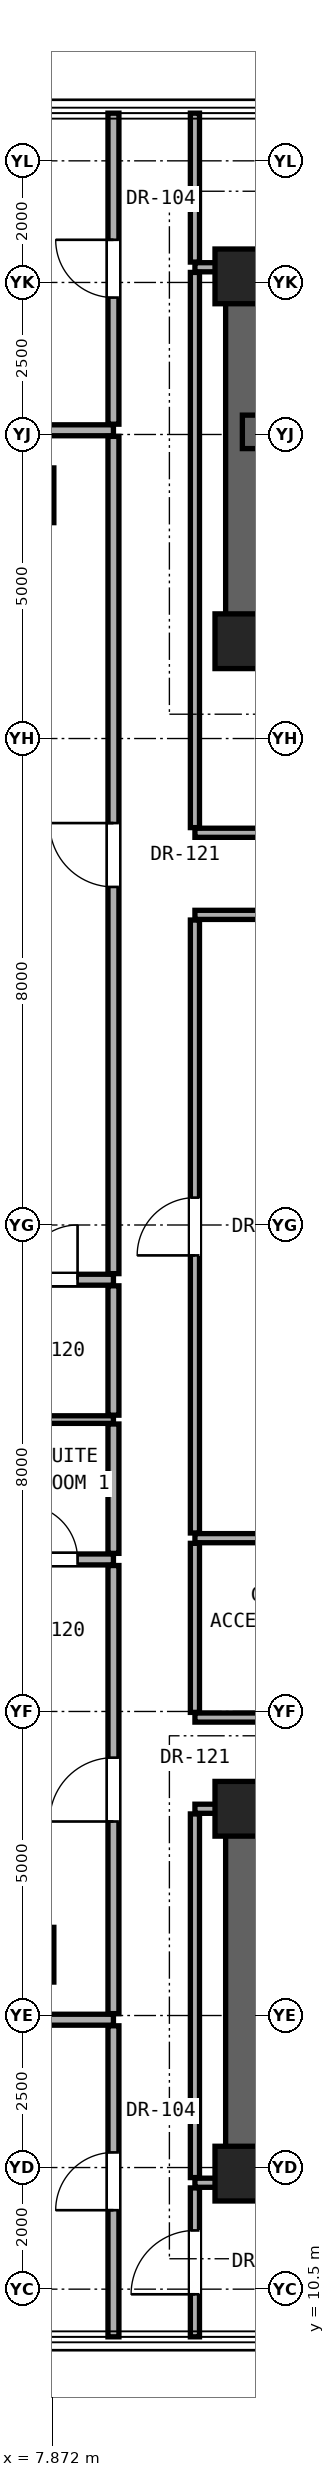
"""IFC4 building model, lengths in metres.
Left out: names, types, materials, properties, quantities, classifications, styles, units other than length and angle.
Written with IfcOpenShell. Run it as: python <this file> out.ifc"""

import sys

from ifc_helpers import new_model, si_unit, direction, frame, frame_2d, origin, origin_2d, place, context, subcontext, project, spatial, rectangle, extrude, element, fill, save


model = new_model("IFC4")
c1 = context("Model", 3, precision=1e-05, world=origin(), true_north=direction((0.0, 1.0)))
c2 = subcontext(c1, "Body", "Model", "MODEL_VIEW")
j1 = project(units=[si_unit("LENGTHUNIT", "METRE"), si_unit("PLANEANGLEUNIT", "RADIAN")], contexts=[c1])
p1 = place(None, origin())
s1 = spatial("IfcSite", under=j1, at=p1, CompositionType="ELEMENT")
p2 = place(p1, origin())
s2 = spatial("IfcBuilding", under=s1, at=p2, CompositionType="ELEMENT")
p3 = place(p2, frame((0.0, 0.0, 193.4)))
s3 = spatial("IfcBuildingStorey", under=s2, at=p3, CompositionType="ELEMENT", Elevation=193.4)
for number, where, z_axis, x_axis in (
    (1, (11.0, 12.4, 0.0), (0.0, 0.0, 1.0), (1.0, 0.0, 0.0)),
    (2, (11.0, 18.4, 0.0), (0.0, 0.0, 1.0), (1.0, 0.0, 0.0)),
    (3, (11.0, 37.6, 0.0), (0.0, 0.0, 1.0), (1.0, 0.0, 0.0)),
    (4, (11.0, 43.6, 0.0), (0.0, 0.0, 1.0), (1.0, 0.0, 0.0)),
):
    element("IfcColumn", number, at=place(p3, frame(where, z_axis=z_axis, x_axis=x_axis)), inside=s3, PredefinedType="COLUMN", context=c2, shape_type="SweptSolid", body=[
        extrude(rectangle(XDim=0.9, YDim=0.9, at=origin_2d()), origin(), (0.0, 0.0, 1.0), 3.25),
    ])
for number, where, z_axis, x_axis in (
    (5, (7.6, 16.0, 0.0), (0.0, 0.0, 1.0), (1.0, 0.0, 0.0)),
    (6, (7.6, 40.0, 0.0), (0.0, 0.0, 1.0), (1.0, 0.0, 0.0)),
):
    element("IfcColumn", number, at=place(p3, frame(where, z_axis=z_axis, x_axis=x_axis)), inside=s3, PredefinedType="PILASTER", context=c2, shape_type="SweptSolid", body=[
        extrude(rectangle(XDim=0.6, YDim=0.9, at=origin_2d()), origin(), (0.0, 0.0, 1.0), 3.25),
    ])
p4 = place(p3, frame((11.0, 43.6, 0.0), z_axis=(0.0, 0.0, 1.0), x_axis=(1.0, 0.0, 0.0)))
e7 = element("IfcWall", 7, at=p4, inside=s3, PredefinedType="SHEAR", context=c2, shape_type="SweptSolid", body=[
    extrude(rectangle(XDim=19.0, YDim=0.55, at=frame_2d((9.5, 0.0))), origin(), (0.0, 0.0, 1.0), 3.05),
])
p5 = place(p3, frame((11.0, 37.6, 0.0), z_axis=(0.0, 0.0, 1.0), x_axis=(0.0, 1.0, 0.0)))
e8 = element("IfcWall", 8, at=p5, inside=s3, PredefinedType="SHEAR", context=c2, shape_type="SweptSolid", body=[
    extrude(rectangle(XDim=6.0, YDim=0.55, at=frame_2d((3.0, 0.0))), origin(), (0.0, 0.0, 1.0), 3.05),
])
p6 = place(p3, frame((11.0, 37.6, 0.0), z_axis=(0.0, 0.0, 1.0), x_axis=(1.0, 0.0, 0.0)))
e9 = element("IfcWall", 9, at=p6, inside=s3, PredefinedType="SHEAR", context=c2, shape_type="SweptSolid", body=[
    extrude(rectangle(XDim=19.0, YDim=0.55, at=frame_2d((9.5, 0.0))), origin(), (0.0, 0.0, 1.0), 3.05),
])
p7 = place(p6, frame((1.06, 0.0, 0.0)))
e10 = element("IfcOpeningElement", 10, at=p7, cuts=e9, PredefinedType="OPENING", context=c2, shape_type="SweptSolid", body=[
    extrude(rectangle(XDim=1.15, YDim=2.2, at=frame_2d((0.575, 1.1))), frame((0.0, 0.285, 0.0), z_axis=(0.0, -1.0, 0.0), x_axis=(1.0, 0.0, 0.0)), (0.0, 0.0, 1.0), 0.57),
])
p8 = place(p6, frame((9.55, 0.0, 0.0)))
e11 = element("IfcOpeningElement", 11, at=p8, cuts=e9, PredefinedType="OPENING", context=c2, shape_type="SweptSolid", body=[
    extrude(rectangle(XDim=1.4, YDim=2.35, at=frame_2d((0.7, 1.175))), frame((0.0, 0.285, 0.0), z_axis=(0.0, -1.0, 0.0), x_axis=(1.0, 0.0, 0.0)), (0.0, 0.0, 1.0), 0.57),
])
p9 = place(p6, frame((11.95, 0.0, 0.0)))
e12 = element("IfcOpeningElement", 12, at=p9, cuts=e9, PredefinedType="OPENING", context=c2, shape_type="SweptSolid", body=[
    extrude(rectangle(XDim=1.4, YDim=2.35, at=frame_2d((0.7, 1.175))), frame((0.0, 0.285, 0.0), z_axis=(0.0, -1.0, 0.0), x_axis=(1.0, 0.0, 0.0)), (0.0, 0.0, 1.0), 0.57),
])
p10 = place(p3, frame((11.0, 41.043, 0.0), z_axis=(0.0, 0.0, 1.0), x_axis=(1.0, 0.0, 0.0)))
e13 = element("IfcWall", 13, at=p10, inside=s3, PredefinedType="SHEAR", context=c2, shape_type="SweptSolid", body=[
    extrude(rectangle(XDim=9.0, YDim=0.55, at=frame_2d((4.5, 0.0))), origin(), (0.0, 0.0, 1.0), 3.05),
])
p11 = place(p3, frame((11.0, 12.4, 0.0), z_axis=(0.0, 0.0, 1.0), x_axis=(1.0, 0.0, 0.0)))
e14 = element("IfcWall", 14, at=p11, inside=s3, PredefinedType="SHEAR", context=c2, shape_type="SweptSolid", body=[
    extrude(rectangle(XDim=19.0, YDim=0.55, at=frame_2d((9.5, 0.0))), origin(), (0.0, 0.0, 1.0), 3.05),
])
p12 = place(p3, frame((11.0, 12.4, 0.0), z_axis=(0.0, 0.0, 1.0), x_axis=(0.0, 1.0, 0.0)))
e15 = element("IfcWall", 15, at=p12, inside=s3, PredefinedType="SHEAR", context=c2, shape_type="SweptSolid", body=[
    extrude(rectangle(XDim=6.0, YDim=0.55, at=frame_2d((3.0, 0.0))), origin(), (0.0, 0.0, 1.0), 3.05),
])
p13 = place(p3, frame((11.0, 18.4, 0.0), z_axis=(0.0, 0.0, 1.0), x_axis=(1.0, 0.0, 0.0)))
e16 = element("IfcWall", 16, at=p13, inside=s3, PredefinedType="SHEAR", context=c2, shape_type="SweptSolid", body=[
    extrude(rectangle(XDim=19.0, YDim=0.55, at=frame_2d((9.5, 0.0))), origin(), (0.0, 0.0, 1.0), 3.05),
])
p14 = place(p13, frame((4.175, 0.0, 0.0)))
e17 = element("IfcOpeningElement", 17, at=p14, cuts=e16, PredefinedType="OPENING", context=c2, shape_type="SweptSolid", body=[
    extrude(rectangle(XDim=1.2, YDim=2.25, at=frame_2d((0.6, 1.125))), frame((0.0, 0.285, 0.0), z_axis=(0.0, -1.0, 0.0), x_axis=(1.0, 0.0, 0.0)), (0.0, 0.0, 1.0), 0.57),
])
p15 = place(p13, frame((11.075, 0.0, 0.0)))
e18 = element("IfcOpeningElement", 18, at=p15, cuts=e16, PredefinedType="OPENING", context=c2, shape_type="SweptSolid", body=[
    extrude(rectangle(XDim=0.95, YDim=2.15, at=frame_2d((0.475, 1.075))), frame((0.0, 0.285, 0.0), z_axis=(0.0, -1.0, 0.0), x_axis=(1.0, 0.0, 0.0)), (0.0, 0.0, 1.0), 0.57),
])
p16 = place(p13, frame((14.3, 0.0, 0.0)))
e19 = element("IfcOpeningElement", 19, at=p16, cuts=e16, PredefinedType="OPENING", context=c2, shape_type="SweptSolid", body=[
    extrude(rectangle(XDim=1.3, YDim=2.3, at=frame_2d((0.65, 1.15))), frame((0.0, 0.285, 0.0), z_axis=(0.0, -1.0, 0.0), x_axis=(1.0, 0.0, 0.0)), (0.0, 0.0, 1.0), 0.57),
])
p17 = place(p13, frame((16.6, 0.0, 0.0)))
e20 = element("IfcOpeningElement", 20, at=p17, cuts=e16, PredefinedType="OPENING", context=c2, shape_type="SweptSolid", body=[
    extrude(rectangle(XDim=1.3, YDim=2.3, at=frame_2d((0.65, 1.15))), frame((0.0, 0.285, 0.0), z_axis=(0.0, -1.0, 0.0), x_axis=(1.0, 0.0, 0.0)), (0.0, 0.0, 1.0), 0.57),
])
p18 = place(p3, frame((10.22, 12.25, 0.0), z_axis=(0.0, 0.0, 1.0), x_axis=(1.0, 0.0, 0.0)))
e21 = element("IfcWall", 21, at=p18, inside=s3, PredefinedType="PARTITIONING", context=c2, shape_type="SweptSolid", body=[
    extrude(rectangle(XDim=0.51, YDim=0.15, at=frame_2d((0.255, 0.0))), origin(), (0.0, 0.0, 1.0), 3.05),
])
p19 = place(p3, frame((5.565, 14.931, 0.0), z_axis=(0.0, 0.0, 1.0), x_axis=(1.0, 0.0, 0.0)))
e22 = element("IfcWall", 22, at=p19, inside=s3, PredefinedType="PARTITIONING", context=c2, shape_type="SweptSolid", body=[
    extrude(rectangle(XDim=3.315, YDim=0.18, at=frame_2d((1.657, 0.0))), origin(), (0.0, 0.0, 1.0), 3.05),
])
p20 = place(p3, frame((10.22, 18.4, 0.0), z_axis=(0.0, 0.0, 1.0), x_axis=(1.0, 0.0, 0.0)))
e23 = element("IfcWall", 23, at=p20, inside=s3, PredefinedType="PARTITIONING", context=c2, shape_type="SweptSolid", body=[
    extrude(rectangle(XDim=0.51, YDim=0.15, at=frame_2d((0.255, 0.0))), origin(), (0.0, 0.0, 1.0), 2.442),
])
p21 = place(p3, frame((10.22, 19.9, 0.0), z_axis=(0.0, 0.0, 1.0), x_axis=(1.0, 0.0, 0.0)))
e24 = element("IfcWall", 24, at=p21, inside=s3, PredefinedType="PARTITIONING", context=c2, shape_type="SweptSolid", body=[
    extrude(rectangle(XDim=20.56, YDim=0.15, at=frame_2d((10.28, 0.0))), origin(), (0.0, 0.0, 1.0), 2.186),
])
p22 = place(p21, frame((1.36, 0.0, 0.0)))
e25 = element("IfcOpeningElement", 25, at=p22, cuts=e24, PredefinedType="OPENING", context=c2, shape_type="SweptSolid", body=[
    extrude(rectangle(XDim=0.9, YDim=2.1, at=frame_2d((0.45, 1.05))), frame((0.0, 0.085, 0.0), z_axis=(0.0, -1.0, 0.0), x_axis=(1.0, 0.0, 0.0)), (0.0, 0.0, 1.0), 0.17),
])
p23 = place(p21, frame((4.015, 0.0, 0.0)))
e26 = element("IfcOpeningElement", 26, at=p23, cuts=e24, PredefinedType="OPENING", context=c2, shape_type="SweptSolid", body=[
    extrude(rectangle(XDim=0.95, YDim=2.15, at=frame_2d((0.475, 1.075))), frame((0.0, 0.085, 0.0), z_axis=(0.0, -1.0, 0.0), x_axis=(1.0, 0.0, 0.0)), (0.0, 0.0, 1.0), 0.17),
])
p24 = place(p21, frame((12.835, 0.0, 0.0)))
e27 = element("IfcOpeningElement", 27, at=p24, cuts=e24, PredefinedType="OPENING", context=c2, shape_type="SweptSolid", body=[
    extrude(rectangle(XDim=0.85, YDim=2.01, at=frame_2d((0.425, 1.005))), frame((0.0, 0.085, 0.0), z_axis=(0.0, -1.0, 0.0), x_axis=(1.0, 0.0, 0.0)), (0.0, 0.0, 1.0), 0.17),
])
p25 = place(p3, frame((0.33, 22.5, 0.0), z_axis=(0.0, 0.0, 1.0), x_axis=(1.0, 0.0, 0.0)))
e28 = element("IfcWall", 28, at=p25, inside=s3, PredefinedType="PARTITIONING", context=c2, shape_type="SweptSolid", body=[
    extrude(rectangle(XDim=8.55, YDim=0.18, at=frame_2d((4.275, 0.0))), origin(), (0.0, 0.0, 1.0), 2.269),
])
p26 = place(p25, frame((2.8, 0.0, 0.0)))
e29 = element("IfcOpeningElement", 29, at=p26, cuts=e28, PredefinedType="OPENING", context=c2, shape_type="SweptSolid", body=[
    extrude(rectangle(XDim=0.95, YDim=2.15, at=frame_2d((0.475, 1.075))), frame((0.0, 0.1, 0.0), z_axis=(0.0, -1.0, 0.0), x_axis=(1.0, 0.0, 0.0)), (0.0, 0.0, 1.0), 0.2),
])
p27 = place(p25, frame((7.06, 0.0, 0.0)))
e30 = element("IfcOpeningElement", 30, at=p27, cuts=e28, PredefinedType="OPENING", context=c2, shape_type="SweptSolid", body=[
    extrude(rectangle(XDim=0.9, YDim=2.1, at=frame_2d((0.45, 1.05))), frame((0.0, 0.1, 0.0), z_axis=(0.0, -1.0, 0.0), x_axis=(1.0, 0.0, 0.0)), (0.0, 0.0, 1.0), 0.2),
])
p28 = place(p3, frame((10.22, 22.85, 0.0), z_axis=(0.0, 0.0, 1.0), x_axis=(1.0, 0.0, 0.0)))
e31 = element("IfcWall", 31, at=p28, inside=s3, PredefinedType="PARTITIONING", context=c2, shape_type="SweptSolid", body=[
    extrude(rectangle(XDim=6.0, YDim=0.15, at=frame_2d((3.0, 0.0))), origin(), (0.0, 0.0, 1.0), 2.186),
])
p29 = place(p3, frame((0.33, 24.8, 0.0), z_axis=(0.0, 0.0, 1.0), x_axis=(1.0, 0.0, 0.0)))
e32 = element("IfcWall", 32, at=p29, inside=s3, PredefinedType="PARTITIONING", context=c2, shape_type="SweptSolid", body=[
    extrude(rectangle(XDim=8.55, YDim=0.125, at=frame_2d((4.275, 0.0))), origin(), (0.0, 0.0, 1.0), 2.269),
])
p30 = place(p3, frame((0.33, 27.1, 0.0), z_axis=(0.0, 0.0, 1.0), x_axis=(1.0, 0.0, 0.0)))
e33 = element("IfcWall", 33, at=p30, inside=s3, PredefinedType="PARTITIONING", context=c2, shape_type="SweptSolid", body=[
    extrude(rectangle(XDim=8.55, YDim=0.18, at=frame_2d((4.275, 0.0))), origin(), (0.0, 0.0, 1.0), 2.269),
])
p31 = place(p30, frame((2.8, 0.0, 0.0)))
e34 = element("IfcOpeningElement", 34, at=p31, cuts=e33, PredefinedType="OPENING", context=c2, shape_type="SweptSolid", body=[
    extrude(rectangle(XDim=0.95, YDim=2.15, at=frame_2d((0.475, 1.075))), frame((0.0, 0.1, 0.0), z_axis=(0.0, -1.0, 0.0), x_axis=(1.0, 0.0, 0.0)), (0.0, 0.0, 1.0), 0.2),
])
p32 = place(p30, frame((7.06, 0.0, 0.0)))
e35 = element("IfcOpeningElement", 35, at=p32, cuts=e33, PredefinedType="OPENING", context=c2, shape_type="SweptSolid", body=[
    extrude(rectangle(XDim=0.9, YDim=2.1, at=frame_2d((0.45, 1.05))), frame((0.0, 0.1, 0.0), z_axis=(0.0, -1.0, 0.0), x_axis=(1.0, 0.0, 0.0)), (0.0, 0.0, 1.0), 0.2),
])
p33 = place(p3, frame((10.22, 33.1, 0.0), z_axis=(0.0, 0.0, 1.0), x_axis=(1.0, 0.0, 0.0)))
e36 = element("IfcWall", 36, at=p33, inside=s3, PredefinedType="PARTITIONING", context=c2, shape_type="SweptSolid", body=[
    extrude(rectangle(XDim=20.56, YDim=0.15, at=frame_2d((10.28, 0.0))), origin(), (0.0, 0.0, 1.0), 2.186),
])
p34 = place(p33, frame((9.07, 0.0, 0.0)))
e37 = element("IfcOpeningElement", 37, at=p34, cuts=e36, PredefinedType="OPENING", context=c2, shape_type="SweptSolid", body=[
    extrude(rectangle(XDim=0.85, YDim=2.01, at=frame_2d((0.425, 1.005))), frame((0.0, 0.085, 0.0), z_axis=(0.0, -1.0, 0.0), x_axis=(1.0, 0.0, 0.0)), (0.0, 0.0, 1.0), 0.17),
])
p35 = place(p33, frame((16.33, 0.0, 0.0)))
e38 = element("IfcOpeningElement", 38, at=p35, cuts=e36, PredefinedType="OPENING", context=c2, shape_type="SweptSolid", body=[
    extrude(rectangle(XDim=0.85, YDim=2.01, at=frame_2d((0.425, 1.005))), frame((0.0, 0.085, 0.0), z_axis=(0.0, -1.0, 0.0), x_axis=(1.0, 0.0, 0.0)), (0.0, 0.0, 1.0), 0.17),
])
p36 = place(p3, frame((10.22, 34.45, 0.0), z_axis=(0.0, 0.0, 1.0), x_axis=(1.0, 0.0, 0.0)))
e39 = element("IfcWall", 39, at=p36, inside=s3, PredefinedType="PARTITIONING", context=c2, shape_type="SweptSolid", body=[
    extrude(rectangle(XDim=1.58, YDim=0.15, at=frame_2d((0.79, 0.0))), origin(), (0.0, 0.0, 1.0), 2.186),
])
p37 = place(p3, frame((5.565, 41.069, 0.0), z_axis=(0.0, 0.0, 1.0), x_axis=(1.0, 0.0, 0.0)))
e40 = element("IfcWall", 40, at=p37, inside=s3, PredefinedType="PARTITIONING", context=c2, shape_type="SweptSolid", body=[
    extrude(rectangle(XDim=3.315, YDim=0.18, at=frame_2d((1.657, 0.0))), origin(), (0.0, 0.0, 1.0), 3.05),
])
p38 = place(p3, frame((10.22, 43.75, 0.0), z_axis=(0.0, 0.0, 1.0), x_axis=(1.0, 0.0, 0.0)))
e41 = element("IfcWall", 41, at=p38, inside=s3, PredefinedType="PARTITIONING", context=c2, shape_type="SweptSolid", body=[
    extrude(rectangle(XDim=0.51, YDim=0.15, at=frame_2d((0.255, 0.0))), origin(), (0.0, 0.0, 1.0), 3.05),
])
p39 = place(p3, frame((8.88, 9.716, 0.0), z_axis=(0.0, 0.0, 1.0), x_axis=(0.0, 1.0, 0.0)))
e42 = element("IfcWall", 42, at=p39, inside=s3, PredefinedType="PARTITIONING", context=c2, shape_type="SweptSolid", body=[
    extrude(rectangle(XDim=5.115, YDim=0.18, at=frame_2d((2.558, 0.0))), origin(), (0.0, 0.0, 1.0), 3.05),
])
p40 = place(p39, frame((2.083, 0.0, 0.0)))
e43 = element("IfcOpeningElement", 43, at=p40, cuts=e42, PredefinedType="OPENING", context=c2, shape_type="SweptSolid", body=[
    extrude(rectangle(XDim=0.95, YDim=2.15, at=frame_2d((0.475, 1.075))), frame((0.0, 0.1, 0.0), z_axis=(0.0, -1.0, 0.0), x_axis=(1.0, 0.0, 0.0)), (0.0, 0.0, 1.0), 0.2),
])
p41 = place(p3, frame((8.88, 15.031, 0.0), z_axis=(0.0, 0.0, 1.0), x_axis=(0.0, 1.0, 0.0)))
e44 = element("IfcWall", 44, at=p41, inside=s3, PredefinedType="PARTITIONING", context=c2, shape_type="SweptSolid", body=[
    extrude(rectangle(XDim=7.369, YDim=0.18, at=frame_2d((3.685, 0.0))), origin(), (0.0, 0.0, 1.0), 2.442),
])
p42 = place(p41, frame((3.159, 0.0, 0.0)))
e45 = element("IfcOpeningElement", 45, at=p42, cuts=e44, PredefinedType="OPENING", context=c2, shape_type="SweptSolid", body=[
    extrude(rectangle(XDim=1.05, YDim=2.2, at=frame_2d((0.525, 1.1))), frame((0.0, 0.1, 0.0), z_axis=(0.0, -1.0, 0.0), x_axis=(1.0, 0.0, 0.0)), (0.0, 0.0, 1.0), 0.2),
])
for number, where, z_axis, x_axis in (
    (46, (8.88, 22.6, 0.0), (0.0, 0.0, 1.0), (0.0, 1.0, 0.0)),
    (47, (8.88, 24.873, 0.0), (0.0, 0.0, 1.0), (0.0, 1.0, 0.0)),
):
    element("IfcWall", number, at=place(p3, frame(where, z_axis=z_axis, x_axis=x_axis)), inside=s3, PredefinedType="PARTITIONING", context=c2, shape_type="SweptSolid", body=[
        extrude(rectangle(XDim=2.127, YDim=0.18, at=frame_2d((1.064, 0.0))), origin(), (0.0, 0.0, 1.0), 2.346),
    ])
p43 = place(p3, frame((8.88, 27.2, 0.0), z_axis=(0.0, 0.0, 1.0), x_axis=(0.0, 1.0, 0.0)))
e48 = element("IfcWall", 48, at=p43, inside=s3, PredefinedType="PARTITIONING", context=c2, shape_type="SweptSolid", body=[
    extrude(rectangle(XDim=13.769, YDim=0.18, at=frame_2d((6.885, 0.0))), origin(), (0.0, 0.0, 1.0), 2.346),
])
p44 = place(p43, frame((6.36, 0.0, 0.0)))
e49 = element("IfcOpeningElement", 49, at=p44, cuts=e48, PredefinedType="OPENING", context=c2, shape_type="SweptSolid", body=[
    extrude(rectangle(XDim=1.05, YDim=2.2, at=frame_2d((0.525, 1.1))), frame((0.0, 0.1, 0.0), z_axis=(0.0, -1.0, 0.0), x_axis=(1.0, 0.0, 0.0)), (0.0, 0.0, 1.0), 0.2),
])
p45 = place(p3, frame((8.88, 41.169, 0.0), z_axis=(0.0, 0.0, 1.0), x_axis=(0.0, 1.0, 0.0)))
e50 = element("IfcWall", 50, at=p45, inside=s3, PredefinedType="PARTITIONING", context=c2, shape_type="SweptSolid", body=[
    extrude(rectangle(XDim=5.115, YDim=0.18, at=frame_2d((2.558, 0.0))), origin(), (0.0, 0.0, 1.0), 3.05),
])
p46 = place(p45, frame((2.083, 0.0, 0.0)))
e51 = element("IfcOpeningElement", 51, at=p46, cuts=e50, PredefinedType="OPENING", context=c2, shape_type="SweptSolid", body=[
    extrude(rectangle(XDim=0.95, YDim=2.15, at=frame_2d((0.475, 1.075))), frame((0.0, 0.1, 0.0), z_axis=(0.0, -1.0, 0.0), x_axis=(1.0, 0.0, 0.0)), (0.0, 0.0, 1.0), 0.2),
])
p47 = place(p3, frame((10.22, 9.716, 0.0), z_axis=(0.0, 0.0, 1.0), x_axis=(0.0, 1.0, 0.0)))
e52 = element("IfcWall", 52, at=p47, inside=s3, PredefinedType="PARTITIONING", context=c2, shape_type="SweptSolid", body=[
    extrude(rectangle(XDim=2.449, YDim=0.15, at=frame_2d((1.225, 0.0))), origin(), (0.0, 0.0, 1.0), 3.05),
])
p48 = place(p47, frame((0.699, 0.0, 0.0)))
e53 = element("IfcOpeningElement", 53, at=p48, cuts=e52, PredefinedType="OPENING", context=c2, shape_type="SweptSolid", body=[
    extrude(rectangle(XDim=1.05, YDim=2.2, at=frame_2d((0.525, 1.1))), frame((0.0, 0.085, 0.0), z_axis=(0.0, -1.0, 0.0), x_axis=(1.0, 0.0, 0.0)), (0.0, 0.0, 1.0), 0.17),
])
p49 = place(p3, frame((10.22, 12.335, 0.0), z_axis=(0.0, 0.0, 1.0), x_axis=(0.0, 1.0, 0.0)))
e54 = element("IfcWall", 54, at=p49, inside=s3, PredefinedType="PARTITIONING", context=c2, shape_type="SweptSolid", body=[
    extrude(rectangle(XDim=5.98, YDim=0.15, at=frame_2d((2.99, 0.0))), origin(), (0.0, 0.0, 1.0), 2.442),
])
p50 = place(p3, frame((10.22, 19.985, 0.0), z_axis=(0.0, 0.0, 1.0), x_axis=(0.0, 1.0, 0.0)))
e55 = element("IfcWall", 55, at=p50, inside=s3, PredefinedType="PARTITIONING", context=c2, shape_type="SweptSolid", body=[
    extrude(rectangle(XDim=2.78, YDim=0.15, at=frame_2d((1.39, 0.0))), origin(), (0.0, 0.0, 1.0), 3.05),
])
p51 = place(p3, frame((10.22, 22.935, 0.0), z_axis=(0.0, 0.0, 1.0), x_axis=(0.0, 1.0, 0.0)))
e56 = element("IfcWall", 56, at=p51, inside=s3, PredefinedType="PARTITIONING", context=c2, shape_type="SweptSolid", body=[
    extrude(rectangle(XDim=10.08, YDim=0.15, at=frame_2d((5.04, 0.0))), origin(), (0.0, 0.0, 1.0), 2.346),
])
p52 = place(p51, frame((4.565, 0.0, 0.0)))
e57 = element("IfcOpeningElement", 57, at=p52, cuts=e56, PredefinedType="OPENING", context=c2, shape_type="SweptSolid", body=[
    extrude(rectangle(XDim=0.95, YDim=2.15, at=frame_2d((0.475, 1.075))), frame((0.0, 0.085, 0.0), z_axis=(0.0, -1.0, 0.0), x_axis=(1.0, 0.0, 0.0)), (0.0, 0.0, 1.0), 0.17),
])
p53 = place(p3, frame((10.22, 34.535, 0.0), z_axis=(0.0, 0.0, 1.0), x_axis=(0.0, 1.0, 0.0)))
e58 = element("IfcWall", 58, at=p53, inside=s3, PredefinedType="PARTITIONING", context=c2, shape_type="SweptSolid", body=[
    extrude(rectangle(XDim=9.13, YDim=0.15, at=frame_2d((4.565, 0.0))), origin(), (0.0, 0.0, 1.0), 2.442),
])
p54 = place(p3, frame((10.22, 43.835, 0.0), z_axis=(0.0, 0.0, 1.0), x_axis=(0.0, 1.0, 0.0)))
e59 = element("IfcWall", 59, at=p54, inside=s3, PredefinedType="PARTITIONING", context=c2, shape_type="SweptSolid", body=[
    extrude(rectangle(XDim=2.449, YDim=0.15, at=frame_2d((1.225, 0.0))), origin(), (0.0, 0.0, 1.0), 3.05),
])
p55 = place(p42, origin())
e60 = element("IfcDoor", 60, at=p55, inside=s3, OperationType="SINGLE_SWING_LEFT", PredefinedType="DOOR", context=c2, shape_type="SweptSolid", body=[
    extrude(rectangle(XDim=1.05, YDim=2.2, at=frame_2d((0.525, 1.1))), frame((0.0, 0.025, 0.0), z_axis=(0.0, -1.0, 0.0), x_axis=(1.0, 0.0, 0.0)), (0.0, 0.0, 1.0), 0.05),
])
fill(e45, e60)
p56 = place(p27, origin())
e61 = element("IfcDoor", 61, at=p56, inside=s3, OperationType="SINGLE_SWING_LEFT", PredefinedType="DOOR", context=c2, shape_type="SweptSolid", body=[
    extrude(rectangle(XDim=0.9, YDim=2.1, at=frame_2d((0.45, 1.05))), frame((0.0, 0.025, 0.0), z_axis=(0.0, -1.0, 0.0), x_axis=(1.0, 0.0, 0.0)), (0.0, 0.0, 1.0), 0.05),
])
fill(e30, e61)
p57 = place(p44, origin())
e62 = element("IfcDoor", 62, at=p57, inside=s3, OperationType="SINGLE_SWING_RIGHT", PredefinedType="DOOR", context=c2, shape_type="SweptSolid", body=[
    extrude(rectangle(XDim=1.05, YDim=2.2, at=frame_2d((0.525, 1.1))), frame((0.0, 0.025, 0.0), z_axis=(0.0, -1.0, 0.0), x_axis=(1.0, 0.0, 0.0)), (0.0, 0.0, 1.0), 0.05),
])
fill(e49, e62)
p58 = place(p32, origin())
e63 = element("IfcDoor", 63, at=p58, inside=s3, OperationType="SINGLE_SWING_RIGHT", PredefinedType="DOOR", context=c2, shape_type="SweptSolid", body=[
    extrude(rectangle(XDim=0.9, YDim=2.1, at=frame_2d((0.45, 1.05))), frame((0.0, 0.025, 0.0), z_axis=(0.0, -1.0, 0.0), x_axis=(1.0, 0.0, 0.0)), (0.0, 0.0, 1.0), 0.05),
])
fill(e35, e63)
p59 = place(p52, origin())
e64 = element("IfcDoor", 64, at=p59, inside=s3, OperationType="SINGLE_SWING_LEFT", PredefinedType="DOOR", context=c2, shape_type="SweptSolid", body=[
    extrude(rectangle(XDim=0.95, YDim=2.15, at=frame_2d((0.475, 1.075))), frame((0.0, 0.025, 0.0), z_axis=(0.0, -1.0, 0.0), x_axis=(1.0, 0.0, 0.0)), (0.0, 0.0, 1.0), 0.05),
])
fill(e57, e64)
p60 = place(p48, origin())
e65 = element("IfcDoor", 65, at=p60, inside=s3, OperationType="SINGLE_SWING_LEFT", PredefinedType="DOOR", context=c2, shape_type="SweptSolid", body=[
    extrude(rectangle(XDim=1.05, YDim=2.2, at=frame_2d((0.525, 1.1))), frame((0.0, 0.025, 0.0), z_axis=(0.0, -1.0, 0.0), x_axis=(1.0, 0.0, 0.0)), (0.0, 0.0, 1.0), 0.05),
])
fill(e53, e65)
p61 = place(p40, origin())
e66 = element("IfcDoor", 66, at=p61, inside=s3, OperationType="SINGLE_SWING_LEFT", PredefinedType="DOOR", context=c2, shape_type="SweptSolid", body=[
    extrude(rectangle(XDim=0.95, YDim=2.15, at=frame_2d((0.475, 1.075))), frame((0.0, 0.025, 0.0), z_axis=(0.0, -1.0, 0.0), x_axis=(1.0, 0.0, 0.0)), (0.0, 0.0, 1.0), 0.05),
])
fill(e43, e66)
p62 = place(p46, origin())
e67 = element("IfcDoor", 67, at=p62, inside=s3, OperationType="SINGLE_SWING_RIGHT", PredefinedType="DOOR", context=c2, shape_type="SweptSolid", body=[
    extrude(rectangle(XDim=0.95, YDim=2.15, at=frame_2d((0.475, 1.075))), frame((0.0, 0.025, 0.0), z_axis=(0.0, -1.0, 0.0), x_axis=(1.0, 0.0, 0.0)), (0.0, 0.0, 1.0), 0.05),
])
fill(e51, e67)
save(model, sys.argv[1])
